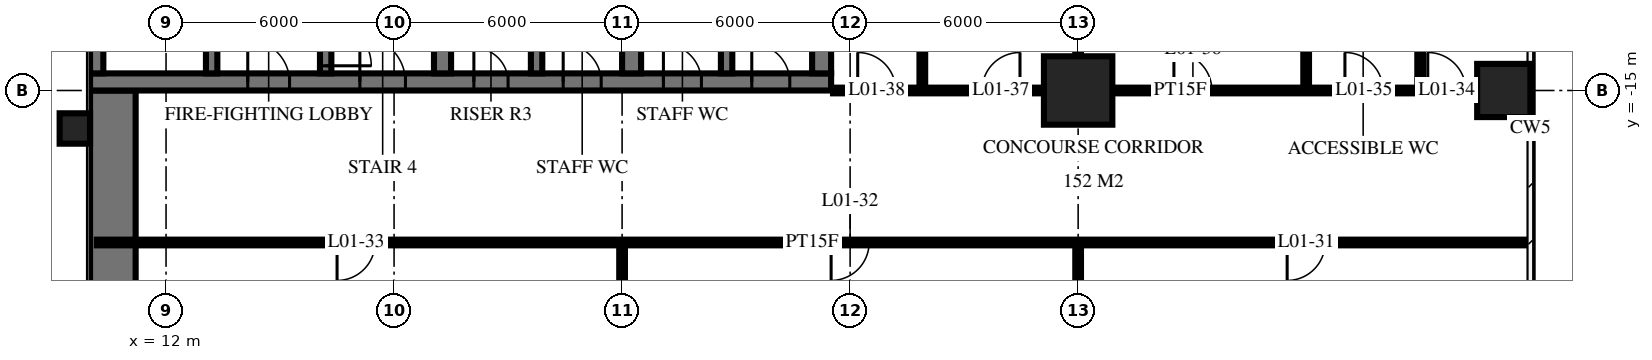
"""IFC4 building model, lengths in metres.
Left out: names, types, materials, properties, quantities, classifications, styles, units other than length and angle.
Written with IfcOpenShell. Run it as: python <this file> out.ifc"""

import sys

from ifc_helpers import new_model, si_unit, direction, frame, frame_2d, origin, origin_2d, place, context, subcontext, project, spatial, rectangle, circle, extrude, element, fill, save


model = new_model("IFC4")
c1 = context("Model", 3, precision=1e-05, world=origin(), true_north=direction((0.0, 1.0)))
c2 = subcontext(c1, "Body", "Model", "MODEL_VIEW")
j1 = project(units=[si_unit("LENGTHUNIT", "METRE"), si_unit("PLANEANGLEUNIT", "RADIAN")], contexts=[c1])
p1 = place(None, origin())
s1 = spatial("IfcSite", under=j1, at=p1, CompositionType="ELEMENT")
p2 = place(p1, origin())
s2 = spatial("IfcBuilding", under=s1, at=p2, CompositionType="ELEMENT")
p3 = place(p2, frame((0.0, 0.0, 7.0)))
s3 = spatial("IfcBuildingStorey", under=s2, at=p3, CompositionType="ELEMENT", Elevation=7.0)
p4 = place(p3, frame((36.0, -15.0, 0.0), z_axis=(0.0, 0.0, 1.0), x_axis=(1.0, 0.0, 0.0)))
e1 = element("IfcColumn", 1, at=p4, inside=s3, PredefinedType="COLUMN", context=c2, shape_type="SweptSolid", body=[
    extrude(circle(Radius=0.9, at=origin_2d()), origin(), (0.0, 0.0, 1.0), 5.5),
])
p5 = place(p3, frame((47.2, -15.0, 0.0), z_axis=(0.0, 0.0, 1.0), x_axis=(1.0, 0.0, 0.0)))
e2 = element("IfcColumn", 2, at=p5, inside=s3, PredefinedType="COLUMN", context=c2, shape_type="SweptSolid", body=[
    extrude(circle(Radius=0.7, at=origin_2d()), origin(), (0.0, 0.0, 1.0), 5.5),
])
p6 = place(p3, frame((10.0, -14.775, 0.0), z_axis=(0.0, 0.0, 1.0), x_axis=(1.0, 0.0, 0.0)))
e3 = element("IfcWall", 3, at=p6, inside=s3, PredefinedType="SHEAR", context=c2, shape_type="SweptSolid", body=[
    extrude(rectangle(XDim=19.5, YDim=0.45, at=frame_2d((9.75, 0.0))), origin(), (0.0, 0.0, 1.0), 5.5),
])
p7 = place(p6, frame((7.1, 0.0, 0.0)))
e4 = element("IfcOpeningElement", 4, at=p7, cuts=e3, PredefinedType="OPENING", context=c2, shape_type="SweptSolid", body=[
    extrude(rectangle(XDim=1.2, YDim=2.1, at=frame_2d((0.6, 1.05))), frame((0.0, 0.235, 0.0), z_axis=(0.0, -1.0, 0.0), x_axis=(1.0, 0.0, 0.0)), (0.0, 0.0, 1.0), 0.47),
])
p8 = place(p6, frame((4.15, 0.0, 0.0)))
e5 = element("IfcOpeningElement", 5, at=p8, cuts=e3, PredefinedType="OPENING", context=c2, shape_type="SweptSolid", body=[
    extrude(rectangle(XDim=1.1, YDim=2.1, at=frame_2d((0.55, 1.05))), frame((0.0, 0.235, 0.0), z_axis=(0.0, -1.0, 0.0), x_axis=(1.0, 0.0, 0.0)), (0.0, 0.0, 1.0), 0.47),
])
p9 = place(p6, frame((10.1, 0.0, 0.0)))
e6 = element("IfcOpeningElement", 6, at=p9, cuts=e3, PredefinedType="OPENING", context=c2, shape_type="SweptSolid", body=[
    extrude(rectangle(XDim=0.9, YDim=2.1, at=frame_2d((0.45, 1.05))), frame((0.0, 0.235, 0.0), z_axis=(0.0, -1.0, 0.0), x_axis=(1.0, 0.0, 0.0)), (0.0, 0.0, 1.0), 0.47),
])
p10 = place(p6, frame((12.45, 0.0, 0.0)))
e7 = element("IfcOpeningElement", 7, at=p10, cuts=e3, PredefinedType="OPENING", context=c2, shape_type="SweptSolid", body=[
    extrude(rectangle(XDim=1.0, YDim=2.1, at=frame_2d((0.5, 1.05))), frame((0.0, 0.235, 0.0), z_axis=(0.0, -1.0, 0.0), x_axis=(1.0, 0.0, 0.0)), (0.0, 0.0, 1.0), 0.47),
])
p11 = place(p6, frame((15.087, 0.0, 0.0)))
e8 = element("IfcOpeningElement", 8, at=p11, cuts=e3, PredefinedType="OPENING", context=c2, shape_type="SweptSolid", body=[
    extrude(rectangle(XDim=1.0, YDim=2.1, at=frame_2d((0.5, 1.05))), frame((0.0, 0.235, 0.0), z_axis=(0.0, -1.0, 0.0), x_axis=(1.0, 0.0, 0.0)), (0.0, 0.0, 1.0), 0.47),
])
p12 = place(p6, frame((17.413, 0.0, 0.0)))
e9 = element("IfcOpeningElement", 9, at=p12, cuts=e3, PredefinedType="OPENING", context=c2, shape_type="SweptSolid", body=[
    extrude(rectangle(XDim=1.0, YDim=2.1, at=frame_2d((0.5, 1.05))), frame((0.0, 0.235, 0.0), z_axis=(0.0, -1.0, 0.0), x_axis=(1.0, 0.0, 0.0)), (0.0, 0.0, 1.0), 0.47),
])
p13 = place(p3, frame((10.175, -14.55, 0.0), z_axis=(0.0, 0.0, 1.0), x_axis=(0.0, 1.0, 0.0)))
e10 = element("IfcWall", 10, at=p13, inside=s3, PredefinedType="SHEAR", context=c2, shape_type="SweptSolid", body=[
    extrude(rectangle(XDim=14.1, YDim=0.35, at=frame_2d((7.05, 0.0))), origin(), (0.0, 0.0, 1.0), 5.5),
])
p14 = place(p3, frame((29.25, -14.55, 0.0), z_axis=(0.0, 0.0, 1.0), x_axis=(0.0, 1.0, 0.0)))
e11 = element("IfcWall", 11, at=p14, inside=s3, PredefinedType="SHEAR", context=c2, shape_type="SweptSolid", body=[
    extrude(rectangle(XDim=14.1, YDim=0.5, at=frame_2d((7.05, 0.0))), origin(), (0.0, 0.0, 1.0), 5.5),
])
p15 = place(p14, frame((8.4, 0.0, 0.0)))
e12 = element("IfcOpeningElement", 12, at=p15, cuts=e11, PredefinedType="OPENING", context=c2, shape_type="SweptSolid", body=[
    extrude(rectangle(XDim=1.4, YDim=2.4, at=frame_2d((0.7, 1.2))), frame((0.0, 0.26, 0.0), z_axis=(0.0, -1.0, 0.0), x_axis=(1.0, 0.0, 0.0)), (0.0, 0.0, 1.0), 0.52),
])
p16 = place(p14, frame((10.0, 0.0, 0.0)))
e13 = element("IfcOpeningElement", 13, at=p16, cuts=e11, PredefinedType="OPENING", context=c2, shape_type="SweptSolid", body=[
    extrude(rectangle(XDim=1.4, YDim=2.4, at=frame_2d((0.7, 1.2))), frame((0.0, 0.26, 0.0), z_axis=(0.0, -1.0, 0.0), x_axis=(1.0, 0.0, 0.0)), (0.0, 0.0, 1.0), 0.52),
])
p17 = place(p3, frame((13.2, -14.55, 0.0), z_axis=(0.0, 0.0, 1.0), x_axis=(0.0, 1.0, 0.0)))
e14 = element("IfcWall", 14, at=p17, inside=s3, PredefinedType="SHEAR", context=c2, shape_type="SweptSolid", body=[
    extrude(rectangle(XDim=5.4, YDim=0.3, at=frame_2d((2.7, 0.0))), origin(), (0.0, 0.0, 1.0), 5.5),
])
p18 = place(p17, frame((4.0, 0.0, 0.0)))
e15 = element("IfcOpeningElement", 15, at=p18, cuts=e14, PredefinedType="OPENING", context=c2, shape_type="SweptSolid", body=[
    extrude(rectangle(XDim=1.2, YDim=2.1, at=frame_2d((0.6, 1.05))), frame((0.0, 0.16, 0.0), z_axis=(0.0, -1.0, 0.0), x_axis=(1.0, 0.0, 0.0)), (0.0, 0.0, 1.0), 0.32),
])
p19 = place(p3, frame((16.2, -14.55, 0.0), z_axis=(0.0, 0.0, 1.0), x_axis=(0.0, 1.0, 0.0)))
e16 = element("IfcWall", 16, at=p19, inside=s3, PredefinedType="SHEAR", context=c2, shape_type="SweptSolid", body=[
    extrude(rectangle(XDim=5.4, YDim=0.3, at=frame_2d((2.7, 0.0))), origin(), (0.0, 0.0, 1.0), 5.5),
])
p20 = place(p19, frame((0.2, 0.0, 0.0)))
e17 = element("IfcOpeningElement", 17, at=p20, cuts=e16, PredefinedType="OPENING", context=c2, shape_type="SweptSolid", body=[
    extrude(rectangle(XDim=1.2, YDim=2.1, at=frame_2d((0.6, 1.05))), frame((0.0, 0.16, 0.0), z_axis=(0.0, -1.0, 0.0), x_axis=(1.0, 0.0, 0.0)), (0.0, 0.0, 1.0), 0.32),
])
p21 = place(p3, frame((19.275, -14.55, 0.0), z_axis=(0.0, 0.0, 1.0), x_axis=(0.0, 1.0, 0.0)))
e18 = element("IfcWall", 18, at=p21, inside=s3, PredefinedType="SHEAR", context=c2, shape_type="SweptSolid", body=[
    extrude(rectangle(XDim=5.4, YDim=0.45, at=frame_2d((2.7, 0.0))), origin(), (0.0, 0.0, 1.0), 5.5),
])
p22 = place(p3, frame((21.75, -14.55, 0.0), z_axis=(0.0, 0.0, 1.0), x_axis=(0.0, 1.0, 0.0)))
e19 = element("IfcWall", 19, at=p22, inside=s3, PredefinedType="SHEAR", context=c2, shape_type="SweptSolid", body=[
    extrude(rectangle(XDim=5.4, YDim=0.3, at=frame_2d((2.7, 0.0))), origin(), (0.0, 0.0, 1.0), 5.5),
])
p23 = place(p3, frame((24.25, -14.55, 0.0), z_axis=(0.0, 0.0, 1.0), x_axis=(0.0, 1.0, 0.0)))
e20 = element("IfcWall", 20, at=p23, inside=s3, PredefinedType="SHEAR", context=c2, shape_type="SweptSolid", body=[
    extrude(rectangle(XDim=5.4, YDim=0.5, at=frame_2d((2.7, 0.0))), origin(), (0.0, 0.0, 1.0), 5.5),
])
p24 = place(p3, frame((26.75, -14.55, 0.0), z_axis=(0.0, 0.0, 1.0), x_axis=(0.0, 1.0, 0.0)))
e21 = element("IfcWall", 21, at=p24, inside=s3, PredefinedType="SHEAR", context=c2, shape_type="SweptSolid", body=[
    extrude(rectangle(XDim=5.4, YDim=0.3, at=frame_2d((2.7, 0.0))), origin(), (0.0, 0.0, 1.0), 5.5),
])
p25 = place(p3, frame((10.6, -40.0, 0.0), z_axis=(0.0, 0.0, 1.0), x_axis=(0.0, 1.0, 0.0)))
e22 = element("IfcWall", 22, at=p25, inside=s3, PredefinedType="SHEAR", context=c2, shape_type="SweptSolid", body=[
    extrude(rectangle(XDim=25.0, YDim=1.2, at=frame_2d((12.5, 0.0))), origin(), (0.0, 0.0, 1.0), 5.5),
])
p26 = place(p3, frame((9.6, -16.0, 0.0), z_axis=(0.0, 0.0, 1.0), x_axis=(1.0, 0.0, 0.0)))
e23 = element("IfcColumn", 23, at=p26, inside=s3, PredefinedType="COLUMN", context=c2, shape_type="SweptSolid", body=[
    extrude(rectangle(XDim=0.8, YDim=0.8, at=origin_2d()), origin(), (0.0, 0.0, 1.0), 5.5),
])
p27 = place(p3, frame((45.0, -15.0, 0.0), z_axis=(0.0, 0.0, 1.0), x_axis=(0.0, 1.0, 0.0)))
e24 = element("IfcWall", 24, at=p27, inside=s3, PredefinedType="PLUMBINGWALL", context=c2, shape_type="SweptSolid", body=[
    extrude(rectangle(XDim=6.0, YDim=0.15, at=frame_2d((3.0, 0.0))), origin(), (0.0, 0.0, 1.0), 5.05),
])
p28 = place(p3, frame((42.0, -15.0, 0.0), z_axis=(0.0, 0.0, 1.0), x_axis=(0.0, 1.0, 0.0)))
e25 = element("IfcWall", 25, at=p28, inside=s3, PredefinedType="PLUMBINGWALL", context=c2, shape_type="SweptSolid", body=[
    extrude(rectangle(XDim=4.5, YDim=0.15, at=frame_2d((2.25, 0.0))), origin(), (0.0, 0.0, 1.0), 5.05),
])
p29 = place(p3, frame((36.0, -39.82, 0.0), z_axis=(0.0, 0.0, 1.0), x_axis=(0.0, 1.0, 0.0)))
e26 = element("IfcWall", 26, at=p29, inside=s3, PredefinedType="PARTITIONING", context=c2, shape_type="SweptSolid", body=[
    extrude(rectangle(XDim=20.82, YDim=0.15, at=frame_2d((10.41, 0.0))), origin(), (0.0, 0.0, 1.0), 5.05),
])
p30 = place(p3, frame((36.0, -15.0, 0.0), z_axis=(0.0, 0.0, 1.0), x_axis=(0.0, 1.0, 0.0)))
e27 = element("IfcWall", 27, at=p30, inside=s3, PredefinedType="PARTITIONING", context=c2, shape_type="SweptSolid", body=[
    extrude(rectangle(XDim=22.82, YDim=0.15, at=frame_2d((11.41, 0.0))), origin(), (0.0, 0.0, 1.0), 5.05),
])
p31 = place(p3, frame((31.9, -15.0, 0.0), z_axis=(0.0, 0.0, 1.0), x_axis=(0.0, 1.0, 0.0)))
e28 = element("IfcWall", 28, at=p31, inside=s3, PredefinedType="PARTITIONING", context=c2, shape_type="SweptSolid", body=[
    extrude(rectangle(XDim=12.5, YDim=0.15, at=frame_2d((6.25, 0.0))), origin(), (0.0, 0.0, 1.0), 5.05),
])
p32 = place(p3, frame((24.0, -39.82, 0.0), z_axis=(0.0, 0.0, 1.0), x_axis=(0.0, 1.0, 0.0)))
e29 = element("IfcWall", 29, at=p32, inside=s3, PredefinedType="PARTITIONING", context=c2, shape_type="SweptSolid", body=[
    extrude(rectangle(XDim=20.82, YDim=0.15, at=frame_2d((10.41, 0.0))), origin(), (0.0, 0.0, 1.0), 5.05),
])
p33 = place(p3, frame((10.18, -19.0, 0.0), z_axis=(0.0, 0.0, 1.0), x_axis=(1.0, 0.0, 0.0)))
e30 = element("IfcWall", 30, at=p33, inside=s3, PredefinedType="PARTITIONING", context=c2, shape_type="SweptSolid", body=[
    extrude(rectangle(XDim=37.64, YDim=0.15, at=frame_2d((18.82, 0.0))), origin(), (0.0, 0.0, 1.0), 5.05),
])
p34 = place(p33, frame((31.32, 0.0, 0.0)))
e31 = element("IfcOpeningElement", 31, at=p34, cuts=e30, PredefinedType="OPENING", context=c2, shape_type="SweptSolid", body=[
    extrude(rectangle(XDim=1.0, YDim=2.1, at=frame_2d((0.5, 1.05))), frame((0.0, 0.085, 0.0), z_axis=(0.0, -1.0, 0.0), x_axis=(1.0, 0.0, 0.0)), (0.0, 0.0, 1.0), 0.17),
])
p35 = place(p33, frame((19.32, 0.0, 0.0)))
e32 = element("IfcOpeningElement", 32, at=p35, cuts=e30, PredefinedType="OPENING", context=c2, shape_type="SweptSolid", body=[
    extrude(rectangle(XDim=1.0, YDim=2.1, at=frame_2d((0.5, 1.05))), frame((0.0, 0.085, 0.0), z_axis=(0.0, -1.0, 0.0), x_axis=(1.0, 0.0, 0.0)), (0.0, 0.0, 1.0), 0.17),
])
p36 = place(p33, frame((6.32, 0.0, 0.0)))
e33 = element("IfcOpeningElement", 33, at=p36, cuts=e30, PredefinedType="OPENING", context=c2, shape_type="SweptSolid", body=[
    extrude(rectangle(XDim=1.0, YDim=2.1, at=frame_2d((0.5, 1.05))), frame((0.0, 0.085, 0.0), z_axis=(0.0, -1.0, 0.0), x_axis=(1.0, 0.0, 0.0)), (0.0, 0.0, 1.0), 0.17),
])
p37 = place(p3, frame((29.55, -15.0, 0.0), z_axis=(0.0, 0.0, 1.0), x_axis=(1.0, 0.0, 0.0)))
e34 = element("IfcWall", 34, at=p37, inside=s3, PredefinedType="PARTITIONING", context=c2, shape_type="SweptSolid", body=[
    extrude(rectangle(XDim=18.27, YDim=0.15, at=frame_2d((9.135, 0.0))), origin(), (0.0, 0.0, 1.0), 5.05),
])
p38 = place(p37, frame((15.65, 0.0, 0.0)))
e35 = element("IfcOpeningElement", 35, at=p38, cuts=e34, PredefinedType="OPENING", context=c2, shape_type="SweptSolid", body=[
    extrude(rectangle(XDim=1.0, YDim=2.1, at=frame_2d((0.5, 1.05))), frame((0.0, 0.085, 0.0), z_axis=(0.0, -1.0, 0.0), x_axis=(1.0, 0.0, 0.0)), (0.0, 0.0, 1.0), 0.17),
])
p39 = place(p37, frame((13.47, 0.0, 0.0)))
e36 = element("IfcOpeningElement", 36, at=p39, cuts=e34, PredefinedType="OPENING", context=c2, shape_type="SweptSolid", body=[
    extrude(rectangle(XDim=1.0, YDim=2.1, at=frame_2d((0.5, 1.05))), frame((0.0, 0.085, 0.0), z_axis=(0.0, -1.0, 0.0), x_axis=(1.0, 0.0, 0.0)), (0.0, 0.0, 1.0), 0.17),
])
p40 = place(p37, frame((8.97, 0.0, 0.0)))
e37 = element("IfcOpeningElement", 37, at=p40, cuts=e34, PredefinedType="OPENING", context=c2, shape_type="SweptSolid", body=[
    extrude(rectangle(XDim=1.0, YDim=2.1, at=frame_2d((0.5, 1.05))), frame((0.0, 0.085, 0.0), z_axis=(0.0, -1.0, 0.0), x_axis=(1.0, 0.0, 0.0)), (0.0, 0.0, 1.0), 0.17),
])
p41 = place(p37, frame((3.92, 0.0, 0.0)))
e38 = element("IfcOpeningElement", 38, at=p41, cuts=e34, PredefinedType="OPENING", context=c2, shape_type="SweptSolid", body=[
    extrude(rectangle(XDim=1.0, YDim=2.1, at=frame_2d((0.5, 1.05))), frame((0.0, 0.085, 0.0), z_axis=(0.0, -1.0, 0.0), x_axis=(1.0, 0.0, 0.0)), (0.0, 0.0, 1.0), 0.17),
])
p42 = place(p37, frame((0.65, 0.0, 0.0)))
e39 = element("IfcOpeningElement", 39, at=p42, cuts=e34, PredefinedType="OPENING", context=c2, shape_type="SweptSolid", body=[
    extrude(rectangle(XDim=1.0, YDim=2.1, at=frame_2d((0.5, 1.05))), frame((0.0, 0.085, 0.0), z_axis=(0.0, -1.0, 0.0), x_axis=(1.0, 0.0, 0.0)), (0.0, 0.0, 1.0), 0.17),
])
p43 = place(p7, origin())
e40 = element("IfcDoor", 40, at=p43, inside=s3, OperationType="SINGLE_SWING_RIGHT", PredefinedType="DOOR", context=c2, shape_type="SweptSolid", body=[
    extrude(rectangle(XDim=1.2, YDim=2.1, at=frame_2d((0.6, 1.05))), frame((0.0, 0.025, 0.0), z_axis=(0.0, -1.0, 0.0), x_axis=(1.0, 0.0, 0.0)), (0.0, 0.0, 1.0), 0.05),
])
fill(e4, e40)
p44 = place(p8, origin())
e41 = element("IfcDoor", 41, at=p44, inside=s3, OperationType="SINGLE_SWING_RIGHT", PredefinedType="DOOR", context=c2, shape_type="SweptSolid", body=[
    extrude(rectangle(XDim=1.1, YDim=2.1, at=frame_2d((0.55, 1.05))), frame((0.0, 0.025, 0.0), z_axis=(0.0, -1.0, 0.0), x_axis=(1.0, 0.0, 0.0)), (0.0, 0.0, 1.0), 0.05),
])
fill(e5, e41)
p45 = place(p9, origin())
e42 = element("IfcDoor", 42, at=p45, inside=s3, OperationType="SINGLE_SWING_RIGHT", PredefinedType="DOOR", context=c2, shape_type="SweptSolid", body=[
    extrude(rectangle(XDim=0.9, YDim=2.1, at=frame_2d((0.45, 1.05))), frame((0.0, 0.025, 0.0), z_axis=(0.0, -1.0, 0.0), x_axis=(1.0, 0.0, 0.0)), (0.0, 0.0, 1.0), 0.05),
])
fill(e6, e42)
p46 = place(p10, origin())
e43 = element("IfcDoor", 43, at=p46, inside=s3, OperationType="SINGLE_SWING_RIGHT", PredefinedType="DOOR", context=c2, shape_type="SweptSolid", body=[
    extrude(rectangle(XDim=1.0, YDim=2.1, at=frame_2d((0.5, 1.05))), frame((0.0, 0.025, 0.0), z_axis=(0.0, -1.0, 0.0), x_axis=(1.0, 0.0, 0.0)), (0.0, 0.0, 1.0), 0.05),
])
fill(e7, e43)
p47 = place(p11, origin())
e44 = element("IfcDoor", 44, at=p47, inside=s3, OperationType="SINGLE_SWING_RIGHT", PredefinedType="DOOR", context=c2, shape_type="SweptSolid", body=[
    extrude(rectangle(XDim=1.0, YDim=2.1, at=frame_2d((0.5, 1.05))), frame((0.0, 0.025, 0.0), z_axis=(0.0, -1.0, 0.0), x_axis=(1.0, 0.0, 0.0)), (0.0, 0.0, 1.0), 0.05),
])
fill(e8, e44)
p48 = place(p12, origin())
e45 = element("IfcDoor", 45, at=p48, inside=s3, OperationType="SINGLE_SWING_RIGHT", PredefinedType="DOOR", context=c2, shape_type="SweptSolid", body=[
    extrude(rectangle(XDim=1.0, YDim=2.1, at=frame_2d((0.5, 1.05))), frame((0.0, 0.025, 0.0), z_axis=(0.0, -1.0, 0.0), x_axis=(1.0, 0.0, 0.0)), (0.0, 0.0, 1.0), 0.05),
])
fill(e9, e45)
p49 = place(p20, frame((0.6, 0.0, 0.0), z_axis=(0.0, 0.0, 1.0), x_axis=(-1.0, 0.0, 0.0)))
e46 = element("IfcDoor", 46, at=p49, inside=s3, OperationType="SINGLE_SWING_LEFT", PredefinedType="DOOR", context=c2, shape_type="SweptSolid", body=[
    extrude(rectangle(XDim=1.2, YDim=2.1, at=frame_2d((0.0, 1.05))), frame((0.0, -0.025, 0.0), z_axis=(0.0, 1.0, 0.0), x_axis=(-1.0, 0.0, 0.0)), (0.0, 0.0, 1.0), 0.05),
])
fill(e17, e46)
p50 = place(p34, frame((0.5, 0.0, 0.0), z_axis=(0.0, 0.0, 1.0), x_axis=(-1.0, 0.0, 0.0)))
e47 = element("IfcDoor", 47, at=p50, inside=s3, OperationType="SINGLE_SWING_LEFT", PredefinedType="DOOR", context=c2, shape_type="SweptSolid", body=[
    extrude(rectangle(XDim=1.0, YDim=2.1, at=frame_2d((0.0, 1.05))), frame((0.0, -0.025, 0.0), z_axis=(0.0, 1.0, 0.0), x_axis=(-1.0, 0.0, 0.0)), (0.0, 0.0, 1.0), 0.05),
])
fill(e31, e47)
p51 = place(p35, frame((0.5, 0.0, 0.0), z_axis=(0.0, 0.0, 1.0), x_axis=(-1.0, 0.0, 0.0)))
e48 = element("IfcDoor", 48, at=p51, inside=s3, OperationType="SINGLE_SWING_LEFT", PredefinedType="DOOR", context=c2, shape_type="SweptSolid", body=[
    extrude(rectangle(XDim=1.0, YDim=2.1, at=frame_2d((0.0, 1.05))), frame((0.0, -0.025, 0.0), z_axis=(0.0, 1.0, 0.0), x_axis=(-1.0, 0.0, 0.0)), (0.0, 0.0, 1.0), 0.05),
])
fill(e32, e48)
p52 = place(p36, frame((0.5, 0.0, 0.0), z_axis=(0.0, 0.0, 1.0), x_axis=(-1.0, 0.0, 0.0)))
e49 = element("IfcDoor", 49, at=p52, inside=s3, OperationType="SINGLE_SWING_LEFT", PredefinedType="DOOR", context=c2, shape_type="SweptSolid", body=[
    extrude(rectangle(XDim=1.0, YDim=2.1, at=frame_2d((0.0, 1.05))), frame((0.0, -0.025, 0.0), z_axis=(0.0, 1.0, 0.0), x_axis=(-1.0, 0.0, 0.0)), (0.0, 0.0, 1.0), 0.05),
])
fill(e33, e49)
p53 = place(p38, origin())
e50 = element("IfcDoor", 50, at=p53, inside=s3, OperationType="SINGLE_SWING_RIGHT", PredefinedType="DOOR", context=c2, shape_type="SweptSolid", body=[
    extrude(rectangle(XDim=1.0, YDim=2.1, at=frame_2d((0.5, 1.05))), frame((0.0, 0.025, 0.0), z_axis=(0.0, -1.0, 0.0), x_axis=(1.0, 0.0, 0.0)), (0.0, 0.0, 1.0), 0.05),
])
fill(e35, e50)
p54 = place(p39, origin())
e51 = element("IfcDoor", 51, at=p54, inside=s3, OperationType="SINGLE_SWING_RIGHT", PredefinedType="DOOR", context=c2, shape_type="SweptSolid", body=[
    extrude(rectangle(XDim=1.0, YDim=2.1, at=frame_2d((0.5, 1.05))), frame((0.0, 0.025, 0.0), z_axis=(0.0, -1.0, 0.0), x_axis=(1.0, 0.0, 0.0)), (0.0, 0.0, 1.0), 0.05),
])
fill(e36, e51)
p55 = place(p40, origin())
e52 = element("IfcDoor", 52, at=p55, inside=s3, OperationType="SINGLE_SWING_RIGHT", PredefinedType="DOOR", context=c2, shape_type="SweptSolid", body=[
    extrude(rectangle(XDim=1.0, YDim=2.1, at=frame_2d((0.5, 1.05))), frame((0.0, 0.025, 0.0), z_axis=(0.0, -1.0, 0.0), x_axis=(1.0, 0.0, 0.0)), (0.0, 0.0, 1.0), 0.05),
])
fill(e37, e52)
p56 = place(p41, origin())
e53 = element("IfcDoor", 53, at=p56, inside=s3, OperationType="SINGLE_SWING_LEFT", PredefinedType="DOOR", context=c2, shape_type="SweptSolid", body=[
    extrude(rectangle(XDim=1.0, YDim=2.1, at=frame_2d((0.5, 1.05))), frame((0.0, 0.025, 0.0), z_axis=(0.0, -1.0, 0.0), x_axis=(1.0, 0.0, 0.0)), (0.0, 0.0, 1.0), 0.05),
])
fill(e38, e53)
p57 = place(p42, origin())
e54 = element("IfcDoor", 54, at=p57, inside=s3, OperationType="SINGLE_SWING_RIGHT", PredefinedType="DOOR", context=c2, shape_type="SweptSolid", body=[
    extrude(rectangle(XDim=1.0, YDim=2.1, at=frame_2d((0.5, 1.05))), frame((0.0, 0.025, 0.0), z_axis=(0.0, -1.0, 0.0), x_axis=(1.0, 0.0, 0.0)), (0.0, 0.0, 1.0), 0.05),
])
fill(e39, e54)
save(model, sys.argv[1])
